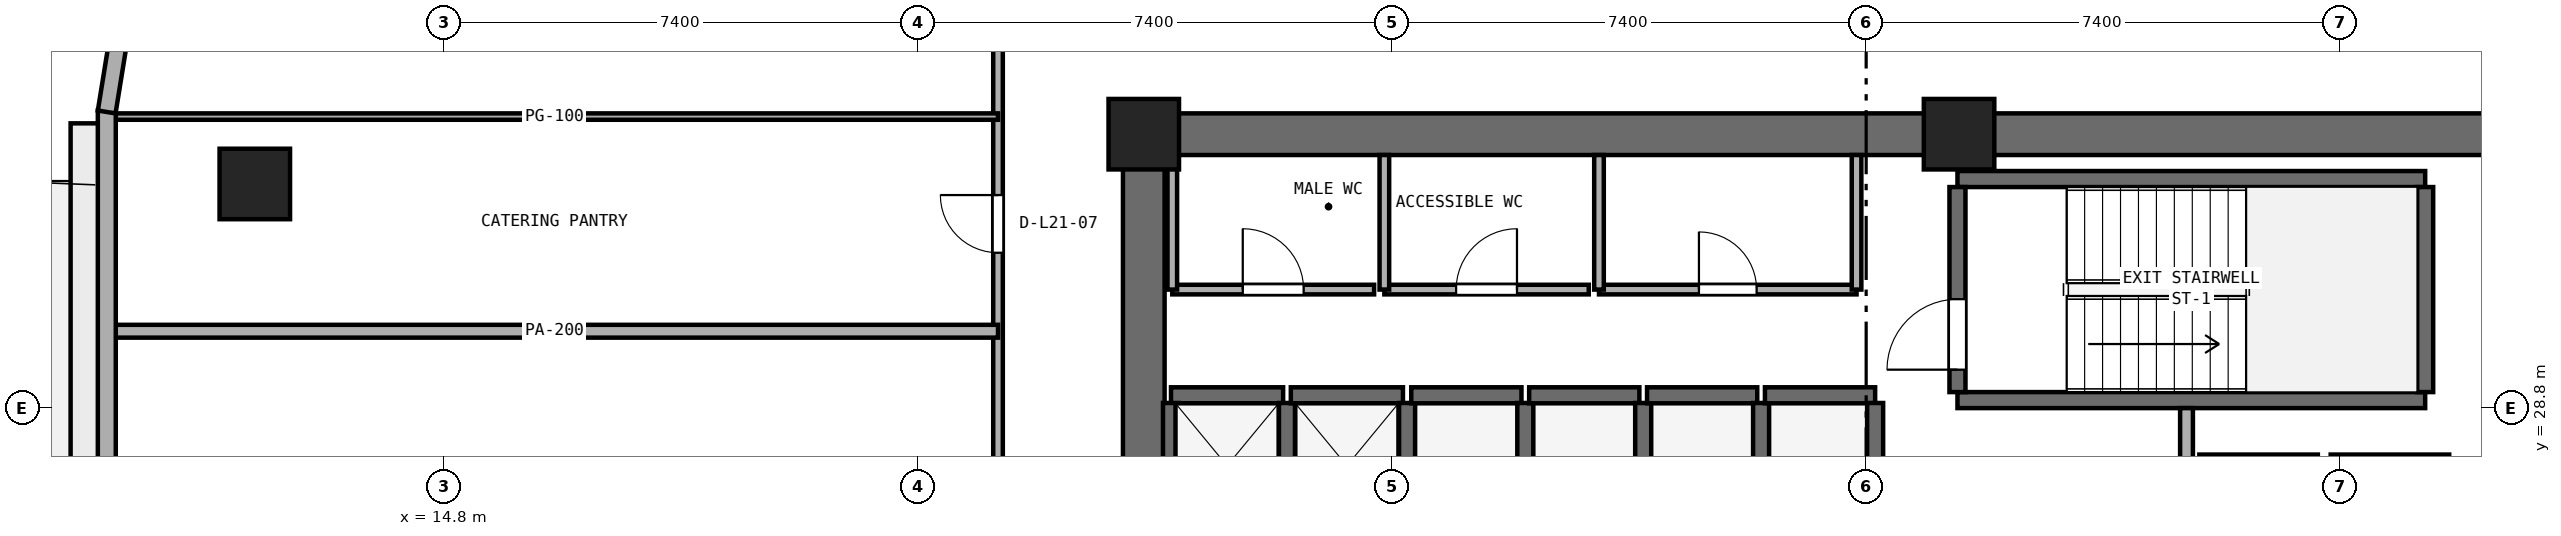
"""IFC4 building model, lengths in metres.
Left out: names, types, materials, properties, quantities, classifications, styles, units other than length and angle.
Written with IfcOpenShell. Run it as: python <this file> out.ifc"""

import sys

from ifc_helpers import new_model, si_unit, direction, frame, frame_2d, origin, origin_2d, place, context, subcontext, project, spatial, rectangle, extrude, element, fill, save


model = new_model("IFC4")
c1 = context("Model", 3, precision=1e-05, world=origin(), true_north=direction((0.0, 1.0)))
c2 = subcontext(c1, "Body", "Model", "MODEL_VIEW")
j1 = project(units=[si_unit("LENGTHUNIT", "METRE"), si_unit("PLANEANGLEUNIT", "RADIAN")], contexts=[c1])
p1 = place(None, origin())
s1 = spatial("IfcSite", under=j1, at=p1, CompositionType="ELEMENT")
p2 = place(p1, origin())
s2 = spatial("IfcBuilding", under=s1, at=p2, CompositionType="ELEMENT")
p3 = place(p2, frame((0.0, 0.0, 85.8)))
s3 = spatial("IfcBuildingStorey", under=s2, at=p3, CompositionType="ELEMENT", Elevation=85.8)
p4 = place(p3, frame((25.4, 33.075, 0.0), z_axis=(0.0, 0.0, 1.0), x_axis=(1.0, 0.0, 0.0)))
e1 = element("IfcWall", 1, at=p4, inside=s3, PredefinedType="SHEAR", context=c2, shape_type="SweptSolid", body=[
    extrude(rectangle(XDim=23.2, YDim=0.65, at=frame_2d((11.6, 0.0))), origin(), (0.0, 0.0, 1.0), 3.525),
])
p5 = place(p3, frame((25.725, 17.65, 0.0), z_axis=(0.0, 0.0, 1.0), x_axis=(0.0, 1.0, 0.0)))
e2 = element("IfcWall", 2, at=p5, inside=s3, PredefinedType="SHEAR", context=c2, shape_type="SweptSolid", body=[
    extrude(rectangle(XDim=15.1, YDim=0.65, at=frame_2d((7.55, 0.0))), origin(), (0.0, 0.0, 1.0), 3.525),
])
p6 = place(p5, frame((6.8, 0.0, 0.0)))
e3 = element("IfcOpeningElement", 3, at=p6, cuts=e2, PredefinedType="OPENING", context=c2, shape_type="SweptSolid", body=[
    extrude(rectangle(XDim=1.5, YDim=2.15, at=frame_2d((0.75, 1.075))), frame((0.0, 0.335, 0.0), z_axis=(0.0, -1.0, 0.0), x_axis=(1.0, 0.0, 0.0)), (0.0, 0.0, 1.0), 0.67),
])
for number, where, z_axis, x_axis in (
    (4, (38.45, 33.075, 0.0), (0.0, 0.0, 1.0), (1.0, 0.0, 0.0)),
    (5, (25.725, 33.075, 0.0), (0.0, 0.0, 1.0), (1.0, 0.0, 0.0)),
):
    element("IfcColumn", number, at=place(p3, frame(where, z_axis=z_axis, x_axis=x_axis)), inside=s3, PredefinedType="PILASTER", context=c2, shape_type="SweptSolid", body=[
        extrude(rectangle(XDim=1.1, YDim=1.1, at=origin_2d()), origin(), (0.0, 0.0, 1.0), 3.8),
    ])
p7 = place(p3, frame((11.85, 32.298, 0.0), z_axis=(0.0, 0.0, 1.0), x_axis=(1.0, 0.0, 0.0)))
e6 = element("IfcColumn", 6, at=p7, inside=s3, PredefinedType="COLUMN", context=c2, shape_type="SweptSolid", body=[
    extrude(rectangle(XDim=1.1, YDim=1.1, at=origin_2d()), origin(), (0.0, 0.0, 1.0), 3.8),
])
for number, where, z_axis, x_axis in (
    (7, (38.425, 28.925, 0.0), (0.0, 0.0, 1.0), (1.0, 0.0, 0.0)),
    (8, (38.425, 32.375, 0.0), (0.0, 0.0, 1.0), (1.0, 0.0, 0.0)),
):
    element("IfcWall", number, at=place(p3, frame(where, z_axis=z_axis, x_axis=x_axis)), inside=s3, PredefinedType="SHEAR", context=c2, shape_type="SweptSolid", body=[
        extrude(rectangle(XDim=7.3, YDim=0.25, at=frame_2d((3.65, 0.0))), origin(), (0.0, 0.0, 1.0), 3.525),
    ])
p8 = place(p3, frame((38.425, 29.05, 0.0), z_axis=(0.0, 0.0, 1.0), x_axis=(0.0, 1.0, 0.0)))
e9 = element("IfcWall", 9, at=p8, inside=s3, PredefinedType="SHEAR", context=c2, shape_type="SweptSolid", body=[
    extrude(rectangle(XDim=3.2, YDim=0.25, at=frame_2d((1.6, 0.0))), origin(), (0.0, 0.0, 1.0), 3.525),
])
p9 = place(p8, frame((0.35, 0.0, 0.0)))
e10 = element("IfcOpeningElement", 10, at=p9, cuts=e9, PredefinedType="OPENING", context=c2, shape_type="SweptSolid", body=[
    extrude(rectangle(XDim=1.1, YDim=2.15, at=frame_2d((0.55, 1.075))), frame((0.0, 0.135, 0.0), z_axis=(0.0, -1.0, 0.0), x_axis=(1.0, 0.0, 0.0)), (0.0, 0.0, 1.0), 0.27),
])
p10 = place(p3, frame((45.725, 29.05, 0.0), z_axis=(0.0, 0.0, 1.0), x_axis=(0.0, 1.0, 0.0)))
e11 = element("IfcWall", 11, at=p10, inside=s3, PredefinedType="SHEAR", context=c2, shape_type="SweptSolid", body=[
    extrude(rectangle(XDim=3.2, YDim=0.25, at=frame_2d((1.6, 0.0))), origin(), (0.0, 0.0, 1.0), 3.525),
])
p11 = place(p3, frame((26.15, 29.0, 0.0), z_axis=(0.0, 0.0, 1.0), x_axis=(1.0, 0.0, 0.0)))
e12 = element("IfcWall", 12, at=p11, inside=s3, PredefinedType="SHEAR", context=c2, shape_type="SweptSolid", body=[
    extrude(rectangle(XDim=1.75, YDim=0.25, at=frame_2d((0.875, 0.0))), origin(), (0.0, 0.0, 1.0), 3.525),
])
for number, where, z_axis, x_axis in (
    (13, (26.15, 26.92, 0.0), (0.0, 0.0, 1.0), (0.0, 1.0, 0.0)),
    (14, (27.96, 26.92, 0.0), (0.0, 0.0, 1.0), (0.0, 1.0, 0.0)),
):
    element("IfcWall", number, at=place(p3, frame(where, z_axis=z_axis, x_axis=x_axis)), inside=s3, PredefinedType="SHEAR", context=c2, shape_type="SweptSolid", body=[
        extrude(rectangle(XDim=1.96, YDim=0.25, at=frame_2d((0.98, 0.0))), origin(), (0.0, 0.0, 1.0), 3.525),
    ])
p12 = place(p3, frame((28.02, 29.0, 0.0), z_axis=(0.0, 0.0, 1.0), x_axis=(1.0, 0.0, 0.0)))
e15 = element("IfcWall", 15, at=p12, inside=s3, PredefinedType="SHEAR", context=c2, shape_type="SweptSolid", body=[
    extrude(rectangle(XDim=1.75, YDim=0.25, at=frame_2d((0.875, 0.0))), origin(), (0.0, 0.0, 1.0), 3.525),
])
p13 = place(p3, frame((29.835, 26.92, 0.0), z_axis=(0.0, 0.0, 1.0), x_axis=(0.0, 1.0, 0.0)))
e16 = element("IfcWall", 16, at=p13, inside=s3, PredefinedType="SHEAR", context=c2, shape_type="SweptSolid", body=[
    extrude(rectangle(XDim=1.96, YDim=0.25, at=frame_2d((0.98, 0.0))), origin(), (0.0, 0.0, 1.0), 3.525),
])
p14 = place(p3, frame((29.9, 29.0, 0.0), z_axis=(0.0, 0.0, 1.0), x_axis=(1.0, 0.0, 0.0)))
e17 = element("IfcWall", 17, at=p14, inside=s3, PredefinedType="SHEAR", context=c2, shape_type="SweptSolid", body=[
    extrude(rectangle(XDim=1.72, YDim=0.25, at=frame_2d((0.86, 0.0))), origin(), (0.0, 0.0, 1.0), 3.525),
])
p15 = place(p3, frame((31.68, 26.92, 0.0), z_axis=(0.0, 0.0, 1.0), x_axis=(0.0, 1.0, 0.0)))
e18 = element("IfcWall", 18, at=p15, inside=s3, PredefinedType="SHEAR", context=c2, shape_type="SweptSolid", body=[
    extrude(rectangle(XDim=1.96, YDim=0.25, at=frame_2d((0.98, 0.0))), origin(), (0.0, 0.0, 1.0), 3.525),
])
p16 = place(p3, frame((31.74, 29.0, 0.0), z_axis=(0.0, 0.0, 1.0), x_axis=(1.0, 0.0, 0.0)))
e19 = element("IfcWall", 19, at=p16, inside=s3, PredefinedType="SHEAR", context=c2, shape_type="SweptSolid", body=[
    extrude(rectangle(XDim=1.72, YDim=0.25, at=frame_2d((0.86, 0.0))), origin(), (0.0, 0.0, 1.0), 3.525),
])
p17 = place(p3, frame((33.52, 26.92, 0.0), z_axis=(0.0, 0.0, 1.0), x_axis=(0.0, 1.0, 0.0)))
e20 = element("IfcWall", 20, at=p17, inside=s3, PredefinedType="SHEAR", context=c2, shape_type="SweptSolid", body=[
    extrude(rectangle(XDim=1.96, YDim=0.25, at=frame_2d((0.98, 0.0))), origin(), (0.0, 0.0, 1.0), 3.525),
])
p18 = place(p3, frame((33.58, 29.0, 0.0), z_axis=(0.0, 0.0, 1.0), x_axis=(1.0, 0.0, 0.0)))
e21 = element("IfcWall", 21, at=p18, inside=s3, PredefinedType="SHEAR", context=c2, shape_type="SweptSolid", body=[
    extrude(rectangle(XDim=1.72, YDim=0.25, at=frame_2d((0.86, 0.0))), origin(), (0.0, 0.0, 1.0), 3.525),
])
p19 = place(p3, frame((35.36, 26.92, 0.0), z_axis=(0.0, 0.0, 1.0), x_axis=(0.0, 1.0, 0.0)))
e22 = element("IfcWall", 22, at=p19, inside=s3, PredefinedType="SHEAR", context=c2, shape_type="SweptSolid", body=[
    extrude(rectangle(XDim=1.96, YDim=0.25, at=frame_2d((0.98, 0.0))), origin(), (0.0, 0.0, 1.0), 3.525),
])
p20 = place(p3, frame((35.42, 29.0, 0.0), z_axis=(0.0, 0.0, 1.0), x_axis=(1.0, 0.0, 0.0)))
e23 = element("IfcWall", 23, at=p20, inside=s3, PredefinedType="SHEAR", context=c2, shape_type="SweptSolid", body=[
    extrude(rectangle(XDim=1.72, YDim=0.25, at=frame_2d((0.86, 0.0))), origin(), (0.0, 0.0, 1.0), 3.525),
])
p21 = place(p3, frame((37.14, 26.92, 0.0), z_axis=(0.0, 0.0, 1.0), x_axis=(0.0, 1.0, 0.0)))
e24 = element("IfcWall", 24, at=p21, inside=s3, PredefinedType="SHEAR", context=c2, shape_type="SweptSolid", body=[
    extrude(rectangle(XDim=1.96, YDim=0.25, at=frame_2d((0.98, 0.0))), origin(), (0.0, 0.0, 1.0), 3.525),
])
for number, where, z_axis, x_axis in (
    (25, (42.2, 27.95, 0.0), (0.0, 0.0, 1.0), (1.0, 0.0, 0.0)),
    (26, (44.25, 27.95, 0.0), (0.0, 0.0, 1.0), (1.0, 0.0, 0.0)),
):
    element("IfcWall", number, at=place(p3, frame(where, z_axis=z_axis, x_axis=x_axis)), inside=s3, PredefinedType="SHEAR", context=c2, shape_type="SweptSolid", body=[
        extrude(rectangle(XDim=1.85, YDim=0.25, at=frame_2d((0.925, 0.0))), origin(), (0.0, 0.0, 1.0), 3.525),
    ])
p22 = place(p3, frame((42.0, 22.75, 0.0), z_axis=(0.0, 0.0, 1.0), x_axis=(0.0, 1.0, 0.0)))
e27 = element("IfcWall", 27, at=p22, inside=s3, PredefinedType="SOLIDWALL", context=c2, shape_type="SweptSolid", body=[
    extrude(rectangle(XDim=6.05, YDim=0.2, at=frame_2d((3.025, 0.0))), origin(), (0.0, 0.0, 1.0), 3.525),
])
p23 = place(p22, frame((0.65, 0.0, 0.0)))
e28 = element("IfcOpeningElement", 28, at=p23, cuts=e27, PredefinedType="OPENING", context=c2, shape_type="SweptSolid", body=[
    extrude(rectangle(XDim=1.2, YDim=2.15, at=frame_2d((0.6, 1.075))), frame((0.0, 0.11, 0.0), z_axis=(0.0, -1.0, 0.0), x_axis=(1.0, 0.0, 0.0)), (0.0, 0.0, 1.0), 0.22),
])
p24 = place(p3, frame((26.17, 30.65, 0.0), z_axis=(0.0, 0.0, 1.0), x_axis=(1.0, 0.0, 0.0)))
e29 = element("IfcWall", 29, at=p24, inside=s3, PredefinedType="PARTITIONING", context=c2, shape_type="SweptSolid", body=[
    extrude(rectangle(XDim=3.15, YDim=0.15, at=frame_2d((1.575, 0.0))), origin(), (0.0, 0.0, 1.0), 3.525),
])
p25 = place(p24, frame((1.1, 0.0, 0.0)))
e30 = element("IfcOpeningElement", 30, at=p25, cuts=e29, PredefinedType="OPENING", context=c2, shape_type="SweptSolid", body=[
    extrude(rectangle(XDim=0.95, YDim=2.1, at=frame_2d((0.475, 1.05))), frame((0.0, 0.085, 0.0), z_axis=(0.0, -1.0, 0.0), x_axis=(1.0, 0.0, 0.0)), (0.0, 0.0, 1.0), 0.17),
])
p26 = place(p3, frame((26.17, 30.65, 0.0), z_axis=(0.0, 0.0, 1.0), x_axis=(0.0, 1.0, 0.0)))
e31 = element("IfcWall", 31, at=p26, inside=s3, PredefinedType="PARTITIONING", context=c2, shape_type="SweptSolid", body=[
    extrude(rectangle(XDim=2.1, YDim=0.15, at=frame_2d((1.05, 0.0))), origin(), (0.0, 0.0, 1.0), 3.525),
])
p27 = place(p3, frame((29.48, 30.65, 0.0), z_axis=(0.0, 0.0, 1.0), x_axis=(1.0, 0.0, 0.0)))
e32 = element("IfcWall", 32, at=p27, inside=s3, PredefinedType="PARTITIONING", context=c2, shape_type="SweptSolid", body=[
    extrude(rectangle(XDim=3.19, YDim=0.15, at=frame_2d((1.595, 0.0))), origin(), (0.0, 0.0, 1.0), 3.525),
])
p28 = place(p27, frame((1.12, 0.0, 0.0)))
e33 = element("IfcOpeningElement", 33, at=p28, cuts=e32, PredefinedType="OPENING", context=c2, shape_type="SweptSolid", body=[
    extrude(rectangle(XDim=0.95, YDim=2.1, at=frame_2d((0.475, 1.05))), frame((0.0, 0.085, 0.0), z_axis=(0.0, -1.0, 0.0), x_axis=(1.0, 0.0, 0.0)), (0.0, 0.0, 1.0), 0.17),
])
p29 = place(p3, frame((29.48, 30.65, 0.0), z_axis=(0.0, 0.0, 1.0), x_axis=(0.0, 1.0, 0.0)))
e34 = element("IfcWall", 34, at=p29, inside=s3, PredefinedType="PARTITIONING", context=c2, shape_type="SweptSolid", body=[
    extrude(rectangle(XDim=2.1, YDim=0.15, at=frame_2d((1.05, 0.0))), origin(), (0.0, 0.0, 1.0), 3.525),
])
p30 = place(p3, frame((32.83, 30.65, 0.0), z_axis=(0.0, 0.0, 1.0), x_axis=(1.0, 0.0, 0.0)))
e35 = element("IfcWall", 35, at=p30, inside=s3, PredefinedType="PARTITIONING", context=c2, shape_type="SweptSolid", body=[
    extrude(rectangle(XDim=4.02, YDim=0.15, at=frame_2d((2.01, 0.0))), origin(), (0.0, 0.0, 1.0), 3.525),
])
p31 = place(p30, frame((1.56, 0.0, 0.0)))
e36 = element("IfcOpeningElement", 36, at=p31, cuts=e35, PredefinedType="OPENING", context=c2, shape_type="SweptSolid", body=[
    extrude(rectangle(XDim=0.9, YDim=2.1, at=frame_2d((0.45, 1.05))), frame((0.0, 0.085, 0.0), z_axis=(0.0, -1.0, 0.0), x_axis=(1.0, 0.0, 0.0)), (0.0, 0.0, 1.0), 0.17),
])
for number, where, z_axis, x_axis in (
    (37, (32.83, 30.65, 0.0), (0.0, 0.0, 1.0), (0.0, 1.0, 0.0)),
    (38, (36.85, 30.65, 0.0), (0.0, 0.0, 1.0), (0.0, 1.0, 0.0)),
):
    element("IfcWall", number, at=place(p3, frame(where, z_axis=z_axis, x_axis=x_axis)), inside=s3, PredefinedType="PARTITIONING", context=c2, shape_type="SweptSolid", body=[
        extrude(rectangle(XDim=2.1, YDim=0.15, at=frame_2d((1.05, 0.0))), origin(), (0.0, 0.0, 1.0), 3.525),
    ])
p32 = place(p3, frame((23.45, 15.05, 0.0), z_axis=(0.0, 0.0, 1.0), x_axis=(0.0, 1.0, 0.0)))
e39 = element("IfcWall", 39, at=p32, inside=s3, PredefinedType="PARTITIONING", context=c2, shape_type="SweptSolid", body=[
    extrude(rectangle(XDim=20.3, YDim=0.15, at=frame_2d((10.15, 0.0))), origin(), (0.0, 0.0, 1.0), 3.525),
])
p33 = place(p32, frame((8.025, 0.0, 0.0)))
e40 = element("IfcOpeningElement", 40, at=p33, cuts=e39, PredefinedType="OPENING", context=c2, shape_type="SweptSolid", body=[
    extrude(rectangle(XDim=0.9, YDim=2.1, at=frame_2d((0.45, 1.05))), frame((0.0, 0.085, 0.0), z_axis=(0.0, -1.0, 0.0), x_axis=(1.0, 0.0, 0.0)), (0.0, 0.0, 1.0), 0.17),
])
p34 = place(p32, frame((16.175, 0.0, 0.0)))
e41 = element("IfcOpeningElement", 41, at=p34, cuts=e39, PredefinedType="OPENING", context=c2, shape_type="SweptSolid", body=[
    extrude(rectangle(XDim=0.9, YDim=2.1, at=frame_2d((0.45, 1.05))), frame((0.0, 0.085, 0.0), z_axis=(0.0, -1.0, 0.0), x_axis=(1.0, 0.0, 0.0)), (0.0, 0.0, 1.0), 0.17),
])
p35 = place(p3, frame((9.605, 30.0, 0.0), z_axis=(0.0, 0.0, 1.0), x_axis=(1.0, 0.0, 0.0)))
e42 = element("IfcWall", 42, at=p35, inside=s3, PredefinedType="PARTITIONING", context=c2, shape_type="SweptSolid", body=[
    extrude(rectangle(XDim=13.845, YDim=0.2, at=frame_2d((6.922, 0.0))), origin(), (0.0, 0.0, 1.0), 3.525),
])
p36 = place(p3, frame((9.605, 33.35, 0.0), z_axis=(0.0, 0.0, 1.0), x_axis=(1.0, 0.0, 0.0)))
e43 = element("IfcWall", 43, at=p36, inside=s3, PredefinedType="PARTITIONING", context=c2, shape_type="SweptSolid", body=[
    extrude(rectangle(XDim=13.845, YDim=0.1, at=frame_2d((6.922, 0.0))), origin(), (0.0, 0.0, 1.0), 3.525),
])
p37 = place(p3, frame((9.54, 33.444, 0.0), z_axis=(0.0, 0.0, 1.0), x_axis=(0.0, -1.0, 0.0)))
e44 = element("IfcWall", 44, at=p37, inside=s3, PredefinedType="STANDARD", context=c2, shape_type="SweptSolid", body=[
    extrude(rectangle(XDim=17.301, YDim=0.28, at=frame_2d((8.65, 0.0))), origin(), (0.0, 0.0, 1.0), 3.525),
])
p38 = place(p37, frame((8.1, 0.0, 0.0)))
e45 = element("IfcOpeningElement", 45, at=p38, cuts=e44, PredefinedType="OPENING", context=c2, shape_type="SweptSolid", body=[
    extrude(rectangle(XDim=1.1, YDim=2.2, at=frame_2d((0.55, 1.1))), frame((0.0, 0.15, 0.0), z_axis=(0.0, -1.0, 0.0), x_axis=(1.0, 0.0, 0.0)), (0.0, 0.0, 1.0), 0.3),
])
p39 = place(p37, frame((12.884, 0.0, 0.9)))
e46 = element("IfcOpeningElement", 46, at=p39, cuts=e44, PredefinedType="OPENING", context=c2, shape_type="SweptSolid", body=[
    extrude(rectangle(XDim=2.4, YDim=1.75, at=frame_2d((1.2, 0.875))), frame((0.0, 0.15, 0.0), z_axis=(0.0, -1.0, 0.0), x_axis=(1.0, 0.0, 0.0)), (0.0, 0.0, 1.0), 0.3),
])
p40 = place(p3, frame((9.753, 34.749, 0.0), z_axis=(0.0, 0.0, 1.0), x_axis=(-0.160037671962, -0.987110907423, 0.0)))
e47 = element("IfcWall", 47, at=p40, inside=s3, PredefinedType="STANDARD", context=c2, shape_type="SweptSolid", body=[
    extrude(rectangle(XDim=1.344, YDim=0.28, at=frame_2d((0.672, 0.0))), origin(), (0.0, 0.0, 1.0), 3.525),
])
p41 = place(p9, origin())
e48 = element("IfcDoor", 48, at=p41, inside=s3, OperationType="SINGLE_SWING_LEFT", PredefinedType="DOOR", context=c2, shape_type="SweptSolid", body=[
    extrude(rectangle(XDim=1.1, YDim=2.15, at=frame_2d((0.55, 1.075))), frame((0.0, 0.025, 0.0), z_axis=(0.0, -1.0, 0.0), x_axis=(1.0, 0.0, 0.0)), (0.0, 0.0, 1.0), 0.05),
])
fill(e10, e48)
p42 = place(p25, origin())
e49 = element("IfcDoor", 49, at=p42, inside=s3, OperationType="SINGLE_SWING_LEFT", PredefinedType="DOOR", context=c2, shape_type="SweptSolid", body=[
    extrude(rectangle(XDim=0.95, YDim=2.1, at=frame_2d((0.475, 1.05))), frame((0.0, 0.025, 0.0), z_axis=(0.0, -1.0, 0.0), x_axis=(1.0, 0.0, 0.0)), (0.0, 0.0, 1.0), 0.05),
])
fill(e30, e49)
p43 = place(p28, origin())
e50 = element("IfcDoor", 50, at=p43, inside=s3, OperationType="SINGLE_SWING_RIGHT", PredefinedType="DOOR", context=c2, shape_type="SweptSolid", body=[
    extrude(rectangle(XDim=0.95, YDim=2.1, at=frame_2d((0.475, 1.05))), frame((0.0, 0.025, 0.0), z_axis=(0.0, -1.0, 0.0), x_axis=(1.0, 0.0, 0.0)), (0.0, 0.0, 1.0), 0.05),
])
fill(e33, e50)
p44 = place(p31, origin())
e51 = element("IfcDoor", 51, at=p44, inside=s3, OperationType="SINGLE_SWING_LEFT", PredefinedType="DOOR", context=c2, shape_type="SweptSolid", body=[
    extrude(rectangle(XDim=0.9, YDim=2.1, at=frame_2d((0.45, 1.05))), frame((0.0, 0.025, 0.0), z_axis=(0.0, -1.0, 0.0), x_axis=(1.0, 0.0, 0.0)), (0.0, 0.0, 1.0), 0.05),
])
fill(e36, e51)
p45 = place(p34, origin())
e52 = element("IfcDoor", 52, at=p45, inside=s3, OperationType="SINGLE_SWING_RIGHT", PredefinedType="DOOR", context=c2, shape_type="SweptSolid", body=[
    extrude(rectangle(XDim=0.9, YDim=2.1, at=frame_2d((0.45, 1.05))), frame((0.0, 0.025, 0.0), z_axis=(0.0, -1.0, 0.0), x_axis=(1.0, 0.0, 0.0)), (0.0, 0.0, 1.0), 0.05),
])
fill(e41, e52)
save(model, sys.argv[1])
